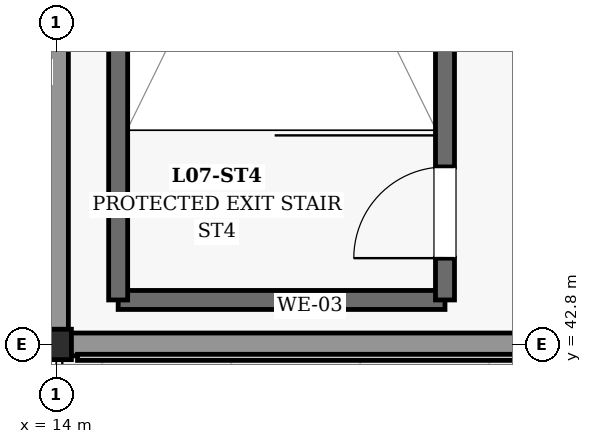
"""IFC4 building model, lengths in metres.
Left out: names, types, materials, properties, quantities, classifications, styles, units other than length and angle.
Written with IfcOpenShell. Run it as: python <this file> out.ifc"""

import sys

from ifc_helpers import new_model, si_unit, direction, frame, frame_2d, origin, origin_2d, place, context, subcontext, project, spatial, rectangle, extrude, element, fill, save


model = new_model("IFC4")
c1 = context("Model", 3, precision=1e-05, world=origin(), true_north=direction((0.0, 1.0)))
c2 = subcontext(c1, "Body", "Model", "MODEL_VIEW")
j1 = project(units=[si_unit("LENGTHUNIT", "METRE"), si_unit("PLANEANGLEUNIT", "RADIAN")], contexts=[c1])
p1 = place(None, origin())
s1 = spatial("IfcSite", under=j1, at=p1, CompositionType="ELEMENT")
p2 = place(p1, origin())
s2 = spatial("IfcBuilding", under=s1, at=p2, CompositionType="ELEMENT")
p3 = place(p2, frame((0.0, 0.0, 32.4)))
s3 = spatial("IfcBuildingStorey", under=s2, at=p3, CompositionType="ELEMENT", Elevation=32.4)
p4 = place(p3, frame((14.0, 42.8, 0.0), z_axis=(0.0, 0.0, 1.0), x_axis=(1.0, 0.0, 0.0)))
e1 = element("IfcColumn", 1, at=p4, inside=s3, PredefinedType="COLUMN", context=c2, shape_type="SweptSolid", body=[
    extrude(rectangle(XDim=0.4, YDim=0.4, at=origin_2d()), origin(), (0.0, 0.0, 1.0), 4.5),
])
p5 = place(p3, frame((14.0, 42.98, 0.0), z_axis=(0.0, 0.0, 1.0), x_axis=(0.0, 1.0, 0.0)))
e2 = element("IfcWall", 2, at=p5, inside=s3, PredefinedType="SOLIDWALL", context=c2, shape_type="SweptSolid", body=[
    extrude(rectangle(XDim=6.815, YDim=0.32, at=frame_2d((3.407, 0.0))), origin(), (0.0, 0.0, 1.0), 3.395),
])
p6 = place(p3, frame((14.18, 42.8, 0.0), z_axis=(0.0, 0.0, 1.0), x_axis=(1.0, 0.0, 0.0)))
e3 = element("IfcWall", 3, at=p6, inside=s3, PredefinedType="SOLIDWALL", context=c2, shape_type="SweptSolid", body=[
    extrude(rectangle(XDim=6.915, YDim=0.3, at=frame_2d((3.458, 0.0))), origin(), (0.0, 0.0, 1.0), 3.395),
])
p7 = place(p3, frame((14.815, 43.385, 0.0), z_axis=(0.0, 0.0, 1.0), x_axis=(1.0, 0.0, 0.0)))
e4 = element("IfcWall", 4, at=p7, inside=s3, PredefinedType="SHEAR", context=c2, shape_type="SweptSolid", body=[
    extrude(rectangle(XDim=4.3, YDim=0.25, at=frame_2d((2.15, 0.0))), origin(), (0.0, 0.0, 1.0), 4.215),
])
p8 = place(p3, frame((19.115, 43.385, 0.0), z_axis=(0.0, 0.0, 1.0), x_axis=(0.0, 1.0, 0.0)))
e5 = element("IfcWall", 5, at=p8, inside=s3, PredefinedType="SHEAR", context=c2, shape_type="SweptSolid", body=[
    extrude(rectangle(XDim=10.63, YDim=0.25, at=frame_2d((5.315, 0.0))), origin(), (0.0, 0.0, 1.0), 4.215),
])
p9 = place(p8, frame((0.55, 0.0, 0.0)))
e6 = element("IfcOpeningElement", 6, at=p9, cuts=e5, PredefinedType="OPENING", context=c2, shape_type="SweptSolid", body=[
    extrude(rectangle(XDim=1.2, YDim=2.15, at=frame_2d((0.6, 1.075))), frame((0.0, 0.135, 0.0), z_axis=(0.0, -1.0, 0.0), x_axis=(1.0, 0.0, 0.0)), (0.0, 0.0, 1.0), 0.27),
])
p10 = place(p3, frame((14.815, 54.015, 0.0), z_axis=(0.0, 0.0, 1.0), x_axis=(0.0, -1.0, 0.0)))
e7 = element("IfcWall", 7, at=p10, inside=s3, PredefinedType="SHEAR", context=c2, shape_type="SweptSolid", body=[
    extrude(rectangle(XDim=10.63, YDim=0.25, at=frame_2d((5.315, 0.0))), origin(), (0.0, 0.0, 1.0), 4.215),
])
p11 = place(p9, origin())
e8 = element("IfcDoor", 8, at=p11, inside=s3, OperationType="SINGLE_SWING_LEFT", PredefinedType="DOOR", context=c2, shape_type="SweptSolid", body=[
    extrude(rectangle(XDim=1.2, YDim=2.15, at=frame_2d((0.6, 1.075))), frame((0.0, 0.025, 0.0), z_axis=(0.0, -1.0, 0.0), x_axis=(1.0, 0.0, 0.0)), (0.0, 0.0, 1.0), 0.05),
])
fill(e6, e8)
save(model, sys.argv[1])
